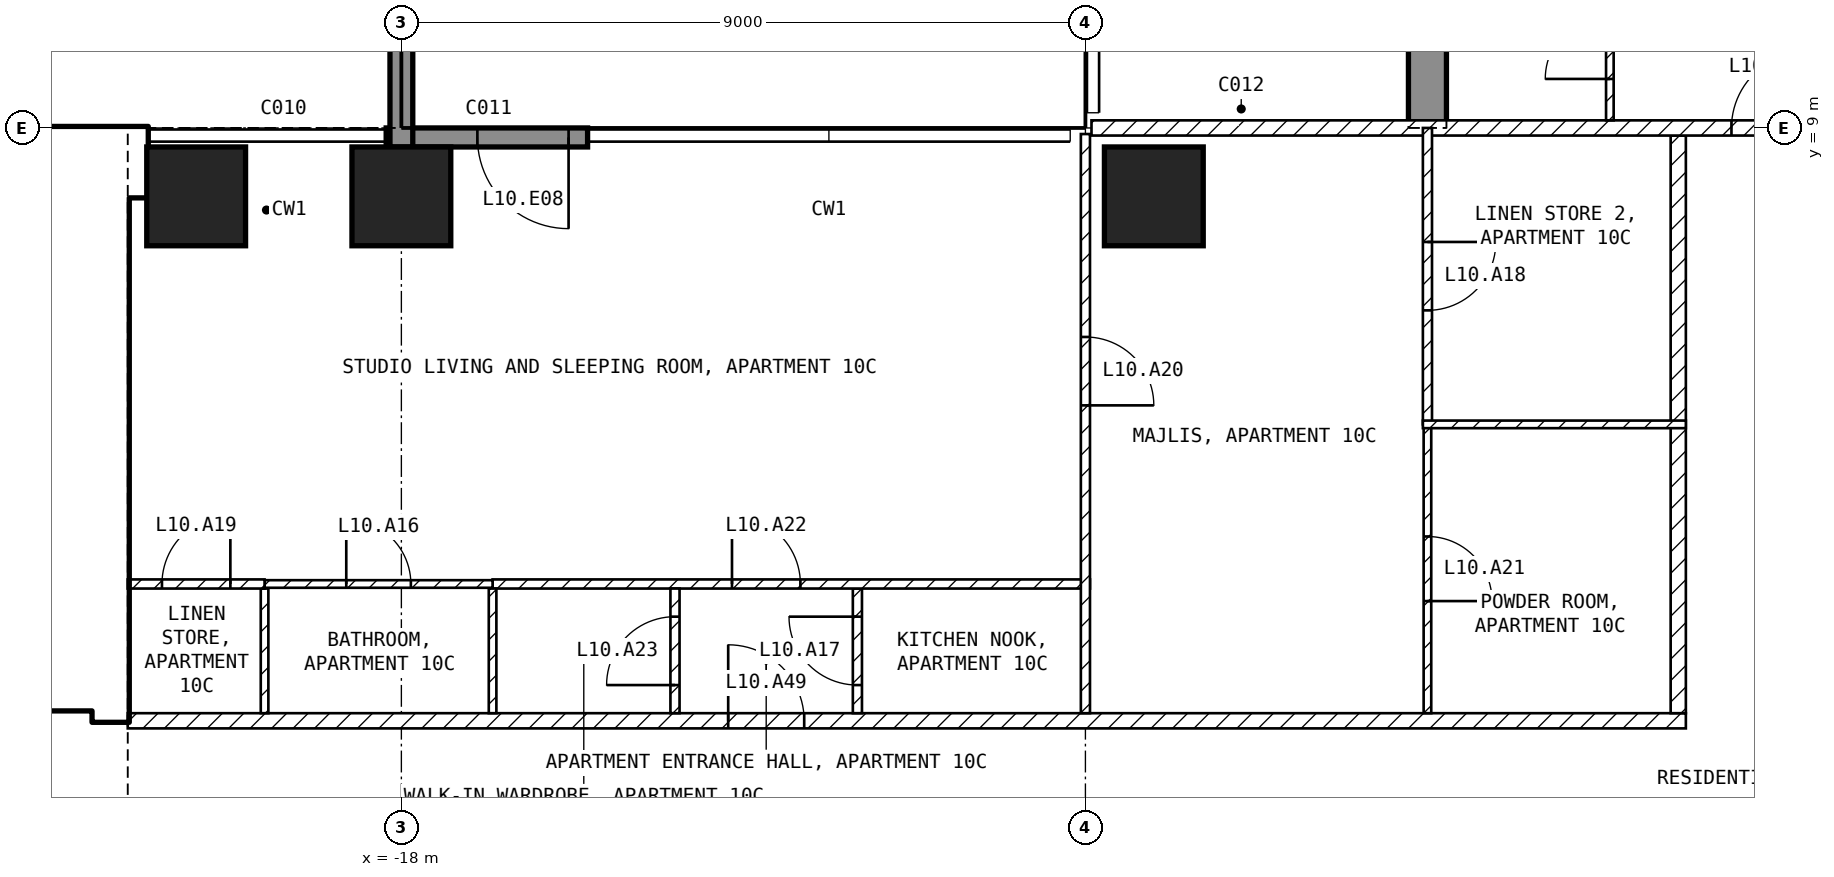
"""IFC4 building model, lengths in metres.
Left out: names, types, materials, properties, quantities, classifications, styles, units other than length and angle.
Written with IfcOpenShell. Run it as: python <this file> out.ifc"""

import sys

from ifc_helpers import new_model, si_unit, direction, frame, frame_2d, origin, origin_2d, place, context, subcontext, project, spatial, polyline, rectangle, outline, extrude, element, fill, save


model = new_model("IFC4")
c1 = context("Model", 3, precision=1e-05, world=origin(), true_north=direction((0.0, 1.0)))
c2 = subcontext(c1, "Body", "Model", "MODEL_VIEW")
j1 = project(units=[si_unit("LENGTHUNIT", "METRE"), si_unit("PLANEANGLEUNIT", "RADIAN")], contexts=[c1])
p1 = place(None, origin())
s1 = spatial("IfcSite", under=j1, at=p1, CompositionType="ELEMENT")
p2 = place(p1, origin())
s2 = spatial("IfcBuilding", under=s1, at=p2, CompositionType="ELEMENT")
p3 = place(p2, frame((0.0, 0.0, 54.0)))
s3 = spatial("IfcBuildingStorey", under=s2, at=p3, CompositionType="ELEMENT", Elevation=54.0)
for number, where, z_axis, x_axis in (
    (1, (-20.7, 8.1, -0.25), (0.0, 0.0, 1.0), (1.0, 0.0, 0.0)),
    (2, (-18.0, 8.1, -0.25), (0.0, 0.0, 1.0), (1.0, 0.0, 0.0)),
    (3, (-8.1, 8.1, -0.25), (0.0, 0.0, 1.0), (1.0, 0.0, 0.0)),
):
    element("IfcColumn", number, at=place(p3, frame(where, z_axis=z_axis, x_axis=x_axis)), inside=s3, PredefinedType="COLUMN", context=c2, shape_type="SweptSolid", body=[
        extrude(rectangle(XDim=1.3, YDim=1.3, at=origin_2d()), origin(), (0.0, 0.0, 1.0), 3.5),
    ])
p4 = place(p3, frame((-4.75, 9.0, -0.25), z_axis=(1.0, 0.0, 0.0), x_axis=(0.0, 1.0, 0.0)))
e4 = element("IfcWall", 4, at=p4, inside=s3, PredefinedType="SHEAR", context=c2, shape_type="SweptSolid", body=[
    extrude(outline(polyline([(0.0, 0.0), (2.1, 0.0), (2.1, 2.65), (4.5, 2.65), (4.5, 0.0), (9.9, 0.0), (9.9, 2.65), (12.3, 2.65), (12.3, 0.0), (16.45, 0.0), (16.45, 3.5), (0.0, 3.5), (0.0, 0.0)])), origin(), (0.0, 0.0, 1.0), 0.5),
])
p5 = place(p3, frame((-15.55, 8.875, 0.0), z_axis=(0.0, 0.0, 1.0), x_axis=(-1.0, 0.0, 0.0)))
e5 = element("IfcWall", 5, at=p5, inside=s3, PredefinedType="SOLIDWALL", context=c2, shape_type="SweptSolid", body=[
    extrude(rectangle(XDim=2.65, YDim=0.25, at=frame_2d((1.325, 0.0))), origin(), (0.0, 0.0, 1.0), 3.25),
])
p6 = place(p5, frame((0.25, 0.0, 0.0)))
e6 = element("IfcOpeningElement", 6, at=p6, cuts=e5, PredefinedType="OPENING", context=c2, shape_type="SweptSolid", body=[
    extrude(rectangle(XDim=1.2, YDim=2.4, at=frame_2d((0.6, 1.2))), frame((0.0, 0.135, 0.0), z_axis=(0.0, -1.0, 0.0), x_axis=(1.0, 0.0, 0.0)), (0.0, 0.0, 1.0), 0.27),
])
p7 = place(p3, frame((-18.0, 8.75, 0.0), z_axis=(0.0, 0.0, 1.0), x_axis=(0.0, 1.0, 0.0)))
e7 = element("IfcWall", 7, at=p7, inside=s3, PredefinedType="SOLIDWALL", context=c2, shape_type="SweptSolid", body=[
    extrude(rectangle(XDim=2.95, YDim=0.3, at=frame_2d((1.475, 0.0))), origin(), (0.0, 0.0, 1.0), 3.25),
])
p8 = place(p3, frame((-31.5, 8.55, 0.0), z_axis=(0.0, 0.0, 1.0), x_axis=(1.0, 0.0, 0.0)))
e8 = element("IfcWall", 8, at=p8, inside=s3, PredefinedType="SHEAR", context=c2, shape_type="SweptSolid", body=[
    extrude(rectangle(XDim=10.15, YDim=0.9, at=frame_2d((5.075, 0.0))), origin(), (0.0, 0.0, 1.0), 3.25),
])
p9 = place(p3, frame((-21.825, 1.2, 0.0), z_axis=(0.0, 0.0, 1.0), x_axis=(0.0, 1.0, 0.0)))
e9 = element("IfcWall", 9, at=p9, inside=s3, PredefinedType="SHEAR", context=c2, shape_type="SweptSolid", body=[
    extrude(rectangle(XDim=6.9, YDim=0.45, at=frame_2d((3.45, 0.0))), origin(), (0.0, 0.0, 1.0), 3.25),
])
p10 = place(p3, frame((-35.1, 1.45, 0.0), z_axis=(0.0, 0.0, 1.0), x_axis=(1.0, 0.0, 0.0)))
e10 = element("IfcWall", 10, at=p10, inside=s3, PredefinedType="SOLIDWALL", context=c2, shape_type="SweptSolid", body=[
    extrude(rectangle(XDim=13.05, YDim=0.2, at=frame_2d((6.525, 0.0))), origin(), (0.0, 0.0, 1.0), 3.25),
])
p11 = place(p10, frame((11.3, 0.0, 0.0)))
e11 = element("IfcOpeningElement", 11, at=p11, cuts=e10, PredefinedType="OPENING", context=c2, shape_type="SweptSolid", body=[
    extrude(rectangle(XDim=1.0, YDim=2.1, at=frame_2d((0.5, 1.05))), frame((0.0, 0.11, 0.0), z_axis=(0.0, -1.0, 0.0), x_axis=(1.0, 0.0, 0.0)), (0.0, 0.0, 1.0), 0.22),
])
p12 = place(p10, frame((8.8, 0.0, 0.0)))
e12 = element("IfcOpeningElement", 12, at=p12, cuts=e10, PredefinedType="OPENING", context=c2, shape_type="SweptSolid", body=[
    extrude(rectangle(XDim=1.0, YDim=2.1, at=frame_2d((0.5, 1.05))), frame((0.0, 0.11, 0.0), z_axis=(0.0, -1.0, 0.0), x_axis=(1.0, 0.0, 0.0)), (0.0, 0.0, 1.0), 0.22),
])
p13 = place(p3, frame((-28.35, 5.15, 0.0), z_axis=(0.0, 0.0, 1.0), x_axis=(1.0, 0.0, 0.0)))
e13 = element("IfcWall", 13, at=p13, inside=s3, PredefinedType="SOLIDWALL", context=c2, shape_type="SweptSolid", body=[
    extrude(rectangle(XDim=6.3, YDim=0.2, at=frame_2d((3.15, 0.0))), origin(), (0.0, 0.0, 1.0), 3.25),
])
p14 = place(p13, frame((5.1, 0.0, 0.0)))
e14 = element("IfcOpeningElement", 14, at=p14, cuts=e13, PredefinedType="OPENING", context=c2, shape_type="SweptSolid", body=[
    extrude(rectangle(XDim=1.0, YDim=2.1, at=frame_2d((0.5, 1.05))), frame((0.0, 0.11, 0.0), z_axis=(0.0, -1.0, 0.0), x_axis=(1.0, 0.0, 0.0)), (0.0, 0.0, 1.0), 0.22),
])
p15 = place(p3, frame((-21.6, 1.2, 0.0), z_axis=(0.0, 0.0, 1.0), x_axis=(1.0, 0.0, 0.0)))
e15 = element("IfcWall", 15, at=p15, inside=s3, PredefinedType="PARTITIONING", context=c2, shape_type="SweptSolid", body=[
    extrude(rectangle(XDim=20.5, YDim=0.2, at=frame_2d((10.25, 0.0))), origin(), (0.0, 0.0, 1.0), 3.25),
])
p16 = place(p15, frame((7.9, 0.0, 0.0)))
e16 = element("IfcOpeningElement", 16, at=p16, cuts=e15, PredefinedType="OPENING", context=c2, shape_type="SweptSolid", body=[
    extrude(rectangle(XDim=1.0, YDim=2.1, at=frame_2d((0.5, 1.05))), frame((0.0, 0.11, 0.0), z_axis=(0.0, -1.0, 0.0), x_axis=(1.0, 0.0, 0.0)), (0.0, 0.0, 1.0), 0.22),
])
p17 = place(p3, frame((-1.2, 1.3, 0.0), z_axis=(0.0, 0.0, 1.0), x_axis=(0.0, 1.0, 0.0)))
e17 = element("IfcWall", 17, at=p17, inside=s3, PredefinedType="PARTITIONING", context=c2, shape_type="SweptSolid", body=[
    extrude(rectangle(XDim=7.6, YDim=0.2, at=frame_2d((3.8, 0.0))), origin(), (0.0, 0.0, 1.0), 3.25),
])
p18 = place(p3, frame((-8.92, 9.0, 0.0), z_axis=(0.0, 0.0, 1.0), x_axis=(1.0, 0.0, 0.0)))
e18 = element("IfcWall", 18, at=p18, inside=s3, PredefinedType="PARTITIONING", context=c2, shape_type="SweptSolid", body=[
    extrude(rectangle(XDim=17.84, YDim=0.2, at=frame_2d((8.92, 0.0))), origin(), (0.0, 0.0, 1.0), 3.25),
])
p19 = place(p18, frame((8.42, 0.0, 0.0)))
e19 = element("IfcOpeningElement", 19, at=p19, cuts=e18, PredefinedType="OPENING", context=c2, shape_type="SweptSolid", body=[
    extrude(rectangle(XDim=1.0, YDim=2.1, at=frame_2d((0.5, 1.05))), frame((0.0, 0.11, 0.0), z_axis=(0.0, -1.0, 0.0), x_axis=(1.0, 0.0, 0.0)), (0.0, 0.0, 1.0), 0.22),
])
p20 = place(p3, frame((-12.0, 1.3, 0.0), z_axis=(0.0, 0.0, 1.0), x_axis=(0.0, 1.0, 0.0)))
e20 = element("IfcWall", 20, at=p20, inside=s3, PredefinedType="PARTITIONING", context=c2, shape_type="SweptSolid", body=[
    extrude(rectangle(XDim=1.64, YDim=0.12, at=frame_2d((0.82, 0.0))), origin(), (0.0, 0.0, 1.0), 3.25),
])
p21 = place(p20, frame((0.37, 0.0, 0.0)))
e21 = element("IfcOpeningElement", 21, at=p21, cuts=e20, PredefinedType="OPENING", context=c2, shape_type="SweptSolid", body=[
    extrude(rectangle(XDim=0.9, YDim=2.1, at=frame_2d((0.45, 1.05))), frame((0.0, 0.07, 0.0), z_axis=(0.0, -1.0, 0.0), x_axis=(1.0, 0.0, 0.0)), (0.0, 0.0, 1.0), 0.14),
])
p22 = place(p3, frame((-16.8, 3.0, 0.0), z_axis=(0.0, 0.0, 1.0), x_axis=(1.0, 0.0, 0.0)))
e22 = element("IfcWall", 22, at=p22, inside=s3, PredefinedType="PARTITIONING", context=c2, shape_type="SweptSolid", body=[
    extrude(rectangle(XDim=7.86, YDim=0.12, at=frame_2d((3.93, 0.0))), origin(), (0.0, 0.0, 1.0), 3.25),
])
p23 = place(p22, frame((3.15, 0.0, 0.0)))
e23 = element("IfcOpeningElement", 23, at=p23, cuts=e22, PredefinedType="OPENING", context=c2, shape_type="SweptSolid", body=[
    extrude(rectangle(XDim=0.9, YDim=2.1, at=frame_2d((0.45, 1.05))), frame((0.0, 0.07, 0.0), z_axis=(0.0, -1.0, 0.0), x_axis=(1.0, 0.0, 0.0)), (0.0, 0.0, 1.0), 0.14),
])
p24 = place(p3, frame((-9.0, 8.92, 0.0), z_axis=(0.0, 0.0, 1.0), x_axis=(0.0, -1.0, 0.0)))
e24 = element("IfcWall", 24, at=p24, inside=s3, PredefinedType="PARTITIONING", context=c2, shape_type="SweptSolid", body=[
    extrude(rectangle(XDim=7.62, YDim=0.12, at=frame_2d((3.81, 0.0))), origin(), (0.0, 0.0, 1.0), 3.25),
])
p25 = place(p24, frame((2.67, 0.0, 0.0)))
e25 = element("IfcOpeningElement", 25, at=p25, cuts=e24, PredefinedType="OPENING", context=c2, shape_type="SweptSolid", body=[
    extrude(rectangle(XDim=0.9, YDim=2.1, at=frame_2d((0.45, 1.05))), frame((0.0, 0.07, 0.0), z_axis=(0.0, -1.0, 0.0), x_axis=(1.0, 0.0, 0.0)), (0.0, 0.0, 1.0), 0.14),
])
p26 = place(p3, frame((-14.4, 1.3, 0.0), z_axis=(0.0, 0.0, 1.0), x_axis=(0.0, 1.0, 0.0)))
e26 = element("IfcWall", 26, at=p26, inside=s3, PredefinedType="PARTITIONING", context=c2, shape_type="SweptSolid", body=[
    extrude(rectangle(XDim=1.64, YDim=0.12, at=frame_2d((0.82, 0.0))), origin(), (0.0, 0.0, 1.0), 3.25),
])
p27 = place(p26, frame((0.37, 0.0, 0.0)))
e27 = element("IfcOpeningElement", 27, at=p27, cuts=e26, PredefinedType="OPENING", context=c2, shape_type="SweptSolid", body=[
    extrude(rectangle(XDim=0.9, YDim=2.1, at=frame_2d((0.45, 1.05))), frame((0.0, 0.07, 0.0), z_axis=(0.0, -1.0, 0.0), x_axis=(1.0, 0.0, 0.0)), (0.0, 0.0, 1.0), 0.14),
])
for number, where, z_axis, x_axis in (
    (28, (-16.8, 1.3, 0.0), (0.0, 0.0, 1.0), (0.0, 1.0, 0.0)),
    (29, (-19.8, 1.3, 0.0), (0.0, 0.0, 1.0), (0.0, 1.0, 0.0)),
):
    element("IfcWall", number, at=place(p3, frame(where, z_axis=z_axis, x_axis=x_axis)), inside=s3, PredefinedType="PARTITIONING", context=c2, shape_type="SweptSolid", body=[
        extrude(rectangle(XDim=1.64, YDim=0.1, at=frame_2d((0.82, 0.0))), origin(), (0.0, 0.0, 1.0), 3.25),
    ])
p28 = place(p3, frame((-19.8, 3.0, 0.0), z_axis=(0.0, 0.0, 1.0), x_axis=(1.0, 0.0, 0.0)))
e30 = element("IfcWall", 30, at=p28, inside=s3, PredefinedType="PARTITIONING", context=c2, shape_type="SweptSolid", body=[
    extrude(rectangle(XDim=3.0, YDim=0.1, at=frame_2d((1.5, 0.0))), origin(), (0.0, 0.0, 1.0), 3.25),
])
p29 = place(p28, frame((1.075, 0.0, 0.0)))
e31 = element("IfcOpeningElement", 31, at=p29, cuts=e30, PredefinedType="OPENING", context=c2, shape_type="SweptSolid", body=[
    extrude(rectangle(XDim=0.85, YDim=2.1, at=frame_2d((0.425, 1.05))), frame((0.0, 0.06, 0.0), z_axis=(0.0, -1.0, 0.0), x_axis=(1.0, 0.0, 0.0)), (0.0, 0.0, 1.0), 0.12),
])
p30 = place(p3, frame((-21.6, 3.0, 0.0), z_axis=(0.0, 0.0, 1.0), x_axis=(1.0, 0.0, 0.0)))
e32 = element("IfcWall", 32, at=p30, inside=s3, PredefinedType="PARTITIONING", context=c2, shape_type="SweptSolid", body=[
    extrude(rectangle(XDim=1.8, YDim=0.12, at=frame_2d((0.9, 0.0))), origin(), (0.0, 0.0, 1.0), 3.25),
])
p31 = place(p30, frame((0.45, 0.0, 0.0)))
e33 = element("IfcOpeningElement", 33, at=p31, cuts=e32, PredefinedType="OPENING", context=c2, shape_type="SweptSolid", body=[
    extrude(rectangle(XDim=0.9, YDim=2.1, at=frame_2d((0.45, 1.05))), frame((0.0, 0.07, 0.0), z_axis=(0.0, -1.0, 0.0), x_axis=(1.0, 0.0, 0.0)), (0.0, 0.0, 1.0), 0.14),
])
p32 = place(p3, frame((-4.5, 5.1, 0.0), z_axis=(0.0, 0.0, 1.0), x_axis=(0.0, -1.0, 0.0)))
e34 = element("IfcWall", 34, at=p32, inside=s3, PredefinedType="PARTITIONING", context=c2, shape_type="SweptSolid", body=[
    extrude(rectangle(XDim=3.8, YDim=0.1, at=frame_2d((1.9, 0.0))), origin(), (0.0, 0.0, 1.0), 3.25),
])
p33 = place(p32, frame((1.475, 0.0, 0.0)))
e35 = element("IfcOpeningElement", 35, at=p33, cuts=e34, PredefinedType="OPENING", context=c2, shape_type="SweptSolid", body=[
    extrude(rectangle(XDim=0.85, YDim=2.1, at=frame_2d((0.425, 1.05))), frame((0.0, 0.06, 0.0), z_axis=(0.0, -1.0, 0.0), x_axis=(1.0, 0.0, 0.0)), (0.0, 0.0, 1.0), 0.12),
])
p34 = place(p3, frame((-4.5, 9.0, 0.0), z_axis=(0.0, 0.0, 1.0), x_axis=(0.0, -1.0, 0.0)))
e36 = element("IfcWall", 36, at=p34, inside=s3, PredefinedType="PARTITIONING", context=c2, shape_type="SweptSolid", body=[
    extrude(rectangle(XDim=3.9, YDim=0.12, at=frame_2d((1.95, 0.0))), origin(), (0.0, 0.0, 1.0), 3.25),
])
p35 = place(p34, frame((1.5, 0.0, 0.0)))
e37 = element("IfcOpeningElement", 37, at=p35, cuts=e36, PredefinedType="OPENING", context=c2, shape_type="SweptSolid", body=[
    extrude(rectangle(XDim=0.9, YDim=2.1, at=frame_2d((0.45, 1.05))), frame((0.0, 0.07, 0.0), z_axis=(0.0, -1.0, 0.0), x_axis=(1.0, 0.0, 0.0)), (0.0, 0.0, 1.0), 0.14),
])
p36 = place(p3, frame((-4.56, 5.1, 0.0), z_axis=(0.0, 0.0, 1.0), x_axis=(1.0, 0.0, 0.0)))
e38 = element("IfcWall", 38, at=p36, inside=s3, PredefinedType="PARTITIONING", context=c2, shape_type="SweptSolid", body=[
    extrude(rectangle(XDim=3.46, YDim=0.1, at=frame_2d((1.73, 0.0))), origin(), (0.0, 0.0, 1.0), 3.25),
])
p37 = place(p3, frame((-2.1, 9.1, 0.0), z_axis=(0.0, 0.0, 1.0), x_axis=(0.0, 1.0, 0.0)))
e39 = element("IfcWall", 39, at=p37, inside=s3, PredefinedType="PARTITIONING", context=c2, shape_type="SweptSolid", body=[
    extrude(rectangle(XDim=1.94, YDim=0.1, at=frame_2d((0.97, 0.0))), origin(), (0.0, 0.0, 1.0), 3.25),
])
p38 = place(p37, frame((0.545, 0.0, 0.0)))
e40 = element("IfcOpeningElement", 40, at=p38, cuts=e39, PredefinedType="OPENING", context=c2, shape_type="SweptSolid", body=[
    extrude(rectangle(XDim=0.85, YDim=2.1, at=frame_2d((0.425, 1.05))), frame((0.0, 0.06, 0.0), z_axis=(0.0, -1.0, 0.0), x_axis=(1.0, 0.0, 0.0)), (0.0, 0.0, 1.0), 0.12),
])
p39 = place(p6, origin())
e41 = element("IfcDoor", 41, at=p39, inside=s3, OperationType="SINGLE_SWING_LEFT", PredefinedType="DOOR", context=c2, shape_type="SweptSolid", body=[
    extrude(rectangle(XDim=1.2, YDim=2.4, at=frame_2d((0.6, 1.2))), frame((0.0, 0.025, 0.0), z_axis=(0.0, -1.0, 0.0), x_axis=(1.0, 0.0, 0.0)), (0.0, 0.0, 1.0), 0.05),
])
fill(e6, e41)
p40 = place(p14, origin())
e42 = element("IfcDoor", 42, at=p40, inside=s3, OperationType="SINGLE_SWING_LEFT", PredefinedType="DOOR", context=c2, shape_type="SweptSolid", body=[
    extrude(rectangle(XDim=1.0, YDim=2.1, at=frame_2d((0.5, 1.05))), frame((0.0, 0.025, 0.0), z_axis=(0.0, -1.0, 0.0), x_axis=(1.0, 0.0, 0.0)), (0.0, 0.0, 1.0), 0.05),
])
fill(e14, e42)
p41 = place(p29, origin())
e43 = element("IfcDoor", 43, at=p41, inside=s3, OperationType="SINGLE_SWING_LEFT", PredefinedType="DOOR", context=c2, shape_type="SweptSolid", body=[
    extrude(rectangle(XDim=0.85, YDim=2.1, at=frame_2d((0.425, 1.05))), frame((0.0, 0.025, 0.0), z_axis=(0.0, -1.0, 0.0), x_axis=(1.0, 0.0, 0.0)), (0.0, 0.0, 1.0), 0.05),
])
fill(e31, e43)
p42 = place(p21, origin())
e44 = element("IfcDoor", 44, at=p42, inside=s3, OperationType="SINGLE_SWING_RIGHT", PredefinedType="DOOR", context=c2, shape_type="SweptSolid", body=[
    extrude(rectangle(XDim=0.9, YDim=2.1, at=frame_2d((0.45, 1.05))), frame((0.0, 0.025, 0.0), z_axis=(0.0, -1.0, 0.0), x_axis=(1.0, 0.0, 0.0)), (0.0, 0.0, 1.0), 0.05),
])
fill(e21, e44)
p43 = place(p35, origin())
e45 = element("IfcDoor", 45, at=p43, inside=s3, OperationType="SINGLE_SWING_LEFT", PredefinedType="DOOR", context=c2, shape_type="SweptSolid", body=[
    extrude(rectangle(XDim=0.9, YDim=2.1, at=frame_2d((0.45, 1.05))), frame((0.0, 0.025, 0.0), z_axis=(0.0, -1.0, 0.0), x_axis=(1.0, 0.0, 0.0)), (0.0, 0.0, 1.0), 0.05),
])
fill(e37, e45)
p44 = place(p31, origin())
e46 = element("IfcDoor", 46, at=p44, inside=s3, OperationType="SINGLE_SWING_RIGHT", PredefinedType="DOOR", context=c2, shape_type="SweptSolid", body=[
    extrude(rectangle(XDim=0.9, YDim=2.1, at=frame_2d((0.45, 1.05))), frame((0.0, 0.025, 0.0), z_axis=(0.0, -1.0, 0.0), x_axis=(1.0, 0.0, 0.0)), (0.0, 0.0, 1.0), 0.05),
])
fill(e33, e46)
p45 = place(p25, origin())
e47 = element("IfcDoor", 47, at=p45, inside=s3, OperationType="SINGLE_SWING_RIGHT", PredefinedType="DOOR", context=c2, shape_type="SweptSolid", body=[
    extrude(rectangle(XDim=0.9, YDim=2.1, at=frame_2d((0.45, 1.05))), frame((0.0, 0.025, 0.0), z_axis=(0.0, -1.0, 0.0), x_axis=(1.0, 0.0, 0.0)), (0.0, 0.0, 1.0), 0.05),
])
fill(e25, e47)
p46 = place(p33, origin())
e48 = element("IfcDoor", 48, at=p46, inside=s3, OperationType="SINGLE_SWING_RIGHT", PredefinedType="DOOR", context=c2, shape_type="SweptSolid", body=[
    extrude(rectangle(XDim=0.85, YDim=2.1, at=frame_2d((0.425, 1.05))), frame((0.0, 0.025, 0.0), z_axis=(0.0, -1.0, 0.0), x_axis=(1.0, 0.0, 0.0)), (0.0, 0.0, 1.0), 0.05),
])
fill(e35, e48)
p47 = place(p23, origin())
e49 = element("IfcDoor", 49, at=p47, inside=s3, OperationType="SINGLE_SWING_LEFT", PredefinedType="DOOR", context=c2, shape_type="SweptSolid", body=[
    extrude(rectangle(XDim=0.9, YDim=2.1, at=frame_2d((0.45, 1.05))), frame((0.0, 0.025, 0.0), z_axis=(0.0, -1.0, 0.0), x_axis=(1.0, 0.0, 0.0)), (0.0, 0.0, 1.0), 0.05),
])
fill(e23, e49)
p48 = place(p27, origin())
e50 = element("IfcDoor", 50, at=p48, inside=s3, OperationType="SINGLE_SWING_LEFT", PredefinedType="DOOR", context=c2, shape_type="SweptSolid", body=[
    extrude(rectangle(XDim=0.9, YDim=2.1, at=frame_2d((0.45, 1.05))), frame((0.0, 0.025, 0.0), z_axis=(0.0, -1.0, 0.0), x_axis=(1.0, 0.0, 0.0)), (0.0, 0.0, 1.0), 0.05),
])
fill(e27, e50)
p49 = place(p19, origin())
e51 = element("IfcDoor", 51, at=p49, inside=s3, OperationType="SINGLE_SWING_RIGHT", PredefinedType="DOOR", context=c2, shape_type="SweptSolid", body=[
    extrude(rectangle(XDim=1.0, YDim=2.1, at=frame_2d((0.5, 1.05))), frame((0.0, 0.025, 0.0), z_axis=(0.0, -1.0, 0.0), x_axis=(1.0, 0.0, 0.0)), (0.0, 0.0, 1.0), 0.05),
])
fill(e19, e51)
p50 = place(p38, origin())
e52 = element("IfcDoor", 52, at=p50, inside=s3, OperationType="SINGLE_SWING_LEFT", PredefinedType="DOOR", context=c2, shape_type="SweptSolid", body=[
    extrude(rectangle(XDim=0.85, YDim=2.1, at=frame_2d((0.425, 1.05))), frame((0.0, 0.025, 0.0), z_axis=(0.0, -1.0, 0.0), x_axis=(1.0, 0.0, 0.0)), (0.0, 0.0, 1.0), 0.05),
])
fill(e40, e52)
p51 = place(p16, origin())
e53 = element("IfcDoor", 53, at=p51, inside=s3, OperationType="SINGLE_SWING_LEFT", PredefinedType="DOOR", context=c2, shape_type="SweptSolid", body=[
    extrude(rectangle(XDim=1.0, YDim=2.1, at=frame_2d((0.5, 1.05))), frame((0.0, 0.025, 0.0), z_axis=(0.0, -1.0, 0.0), x_axis=(1.0, 0.0, 0.0)), (0.0, 0.0, 1.0), 0.05),
])
fill(e16, e53)
save(model, sys.argv[1])
